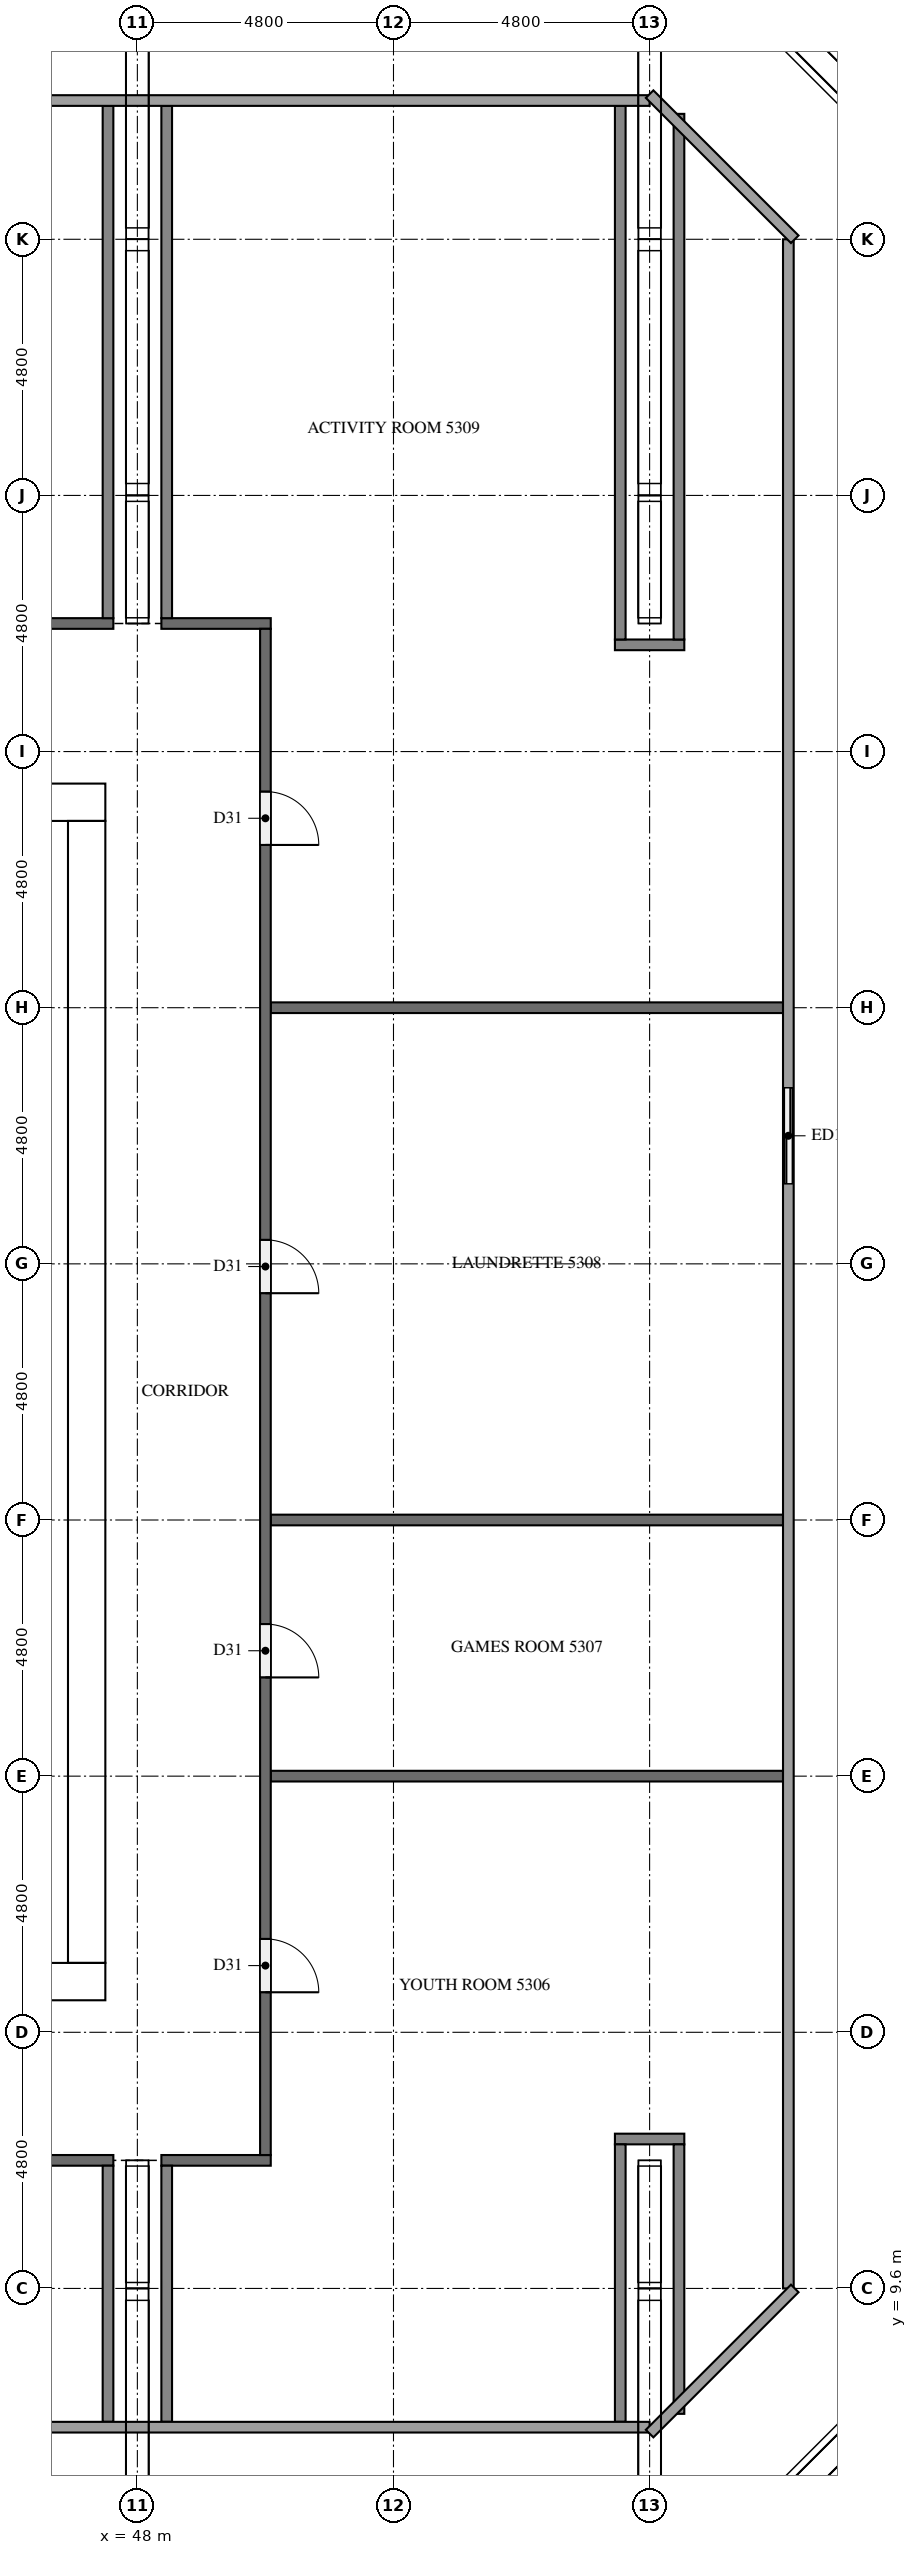
"""IFC4 building model, lengths in metres.
Left out: names, types, materials, properties, quantities, classifications, styles, units other than length and angle.
Written with IfcOpenShell. Run it as: python <this file> out.ifc"""

import sys

from ifc_helpers import new_model, si_unit, direction, frame, frame_2d, origin, place, context, subcontext, project, spatial, rectangle, extrude, element, fill, save


model = new_model("IFC4")
c1 = context("Model", 3, precision=1e-05, world=origin(), true_north=direction((0.0, 1.0)))
c2 = subcontext(c1, "Body", "Model", "MODEL_VIEW")
j1 = project(units=[si_unit("LENGTHUNIT", "METRE"), si_unit("PLANEANGLEUNIT", "RADIAN")], contexts=[c1])
p1 = place(None, origin())
s1 = spatial("IfcSite", under=j1, at=p1, CompositionType="ELEMENT")
p2 = place(p1, origin())
s2 = spatial("IfcBuilding", under=s1, at=p2, CompositionType="ELEMENT")
p3 = place(p2, frame((0.0, 0.0, 203.4)))
s3 = spatial("IfcBuildingStorey", under=s2, at=p3, CompositionType="ELEMENT", Elevation=203.4)
p4 = place(p3, frame((15.0, 15.35, 0.0), z_axis=(0.0, 0.0, 1.0), x_axis=(1.0, 0.0, 0.0)))
e1 = element("IfcWall", 1, at=p4, inside=s3, PredefinedType="SHEAR", context=c2, shape_type="SweptSolid", body=[
    extrude(rectangle(XDim=32.4, YDim=0.7, at=frame_2d((16.2, 0.0))), origin(), (0.0, 0.0, 1.0), 5.1),
])
p5 = place(p4, frame((15.3, 0.0, 0.0)))
e2 = element("IfcOpeningElement", 2, at=p5, cuts=e1, PredefinedType="OPENING", context=c2, shape_type="SweptSolid", body=[
    extrude(rectangle(XDim=1.8, YDim=2.1, at=frame_2d((0.9, 1.05))), frame((0.0, 0.36, 0.0), z_axis=(0.0, -1.0, 0.0), x_axis=(1.0, 0.0, 0.0)), (0.0, 0.0, 1.0), 0.72),
])
p6 = place(p3, frame((15.0, 37.45, 0.0), z_axis=(0.0, 0.0, 1.0), x_axis=(1.0, 0.0, 0.0)))
e3 = element("IfcWall", 3, at=p6, inside=s3, PredefinedType="SHEAR", context=c2, shape_type="SweptSolid", body=[
    extrude(rectangle(XDim=32.4, YDim=0.7, at=frame_2d((16.2, 0.0))), origin(), (0.0, 0.0, 1.0), 5.1),
])
p7 = place(p6, frame((15.3, 0.0, 0.0)))
e4 = element("IfcOpeningElement", 4, at=p7, cuts=e3, PredefinedType="OPENING", context=c2, shape_type="SweptSolid", body=[
    extrude(rectangle(XDim=1.8, YDim=2.1, at=frame_2d((0.9, 1.05))), frame((0.0, 0.36, 0.0), z_axis=(0.0, -1.0, 0.0), x_axis=(1.0, 0.0, 0.0)), (0.0, 0.0, 1.0), 0.72),
])
p8 = place(p6, frame((1.544, 0.0, 0.0)))
e5 = element("IfcOpeningElement", 5, at=p8, cuts=e3, PredefinedType="OPENING", context=c2, shape_type="SweptSolid", body=[
    extrude(rectangle(XDim=1.0, YDim=2.1, at=frame_2d((0.5, 1.05))), frame((0.0, 0.36, 0.0), z_axis=(0.0, -1.0, 0.0), x_axis=(1.0, 0.0, 0.0)), (0.0, 0.0, 1.0), 0.72),
])
p9 = place(p6, frame((5.219, 0.0, 0.0)))
e6 = element("IfcOpeningElement", 6, at=p9, cuts=e3, PredefinedType="OPENING", context=c2, shape_type="SweptSolid", body=[
    extrude(rectangle(XDim=1.0, YDim=2.1, at=frame_2d((0.5, 1.05))), frame((0.0, 0.36, 0.0), z_axis=(0.0, -1.0, 0.0), x_axis=(1.0, 0.0, 0.0)), (0.0, 0.0, 1.0), 0.72),
])
p10 = place(p3, frame((47.05, 15.7, 0.0), z_axis=(0.0, 0.0, 1.0), x_axis=(0.0, 1.0, 0.0)))
e7 = element("IfcWall", 7, at=p10, inside=s3, PredefinedType="SHEAR", context=c2, shape_type="SweptSolid", body=[
    extrude(rectangle(XDim=21.4, YDim=0.7, at=frame_2d((10.7, 0.0))), origin(), (0.0, 0.0, 1.0), 5.1),
])
p11 = place(p10, frame((10.4, 0.0, 0.0)))
e8 = element("IfcOpeningElement", 8, at=p11, cuts=e7, PredefinedType="OPENING", context=c2, shape_type="SweptSolid", body=[
    extrude(rectangle(XDim=1.2, YDim=2.1, at=frame_2d((0.6, 1.05))), frame((0.0, 0.36, 0.0), z_axis=(0.0, -1.0, 0.0), x_axis=(1.0, 0.0, 0.0)), (0.0, 0.0, 1.0), 0.72),
])
p12 = place(p3, frame((60.2, 30.0, 0.0), z_axis=(0.0, 0.0, 1.0), x_axis=(0.0, 1.0, 0.0)))
e9 = element("IfcWall", 9, at=p12, inside=s3, PredefinedType="SOLIDWALL", context=c2, shape_type="SweptSolid", body=[
    extrude(rectangle(XDim=2.4, YDim=0.15, at=frame_2d((1.2, 0.0))), origin(), (0.0, 0.0, 1.0), 5.1),
])
p13 = place(p12, frame((0.3, 0.0, 0.0)))
e10 = element("IfcOpeningElement", 10, at=p13, cuts=e9, PredefinedType="OPENING", context=c2, shape_type="SweptSolid", body=[
    extrude(rectangle(XDim=1.8, YDim=2.4, at=frame_2d((0.9, 1.2))), frame((0.0, 0.085, 0.0), z_axis=(0.0, -1.0, 0.0), x_axis=(1.0, 0.0, 0.0)), (0.0, 0.0, 1.0), 0.17),
])
p14 = place(p3, frame((47.55, 12.0, 0.0), z_axis=(0.0, 0.0, 1.0), x_axis=(-1.0, 0.0, 0.0)))
e11 = element("IfcWall", 11, at=p14, inside=s3, PredefinedType="PARTITIONING", context=c2, shape_type="SweptSolid", body=[
    extrude(rectangle(XDim=8.7, YDim=0.2, at=frame_2d((4.35, 0.0))), origin(), (0.0, 0.0, 1.0), 5.1),
])
p15 = place(p14, frame((6.0, 0.0, 0.0)))
e12 = element("IfcOpeningElement", 12, at=p15, cuts=e11, PredefinedType="OPENING", context=c2, shape_type="SweptSolid", body=[
    extrude(rectangle(XDim=1.0, YDim=2.1, at=frame_2d((0.5, 1.05))), frame((0.0, 0.11, 0.0), z_axis=(0.0, -1.0, 0.0), x_axis=(1.0, 0.0, 0.0)), (0.0, 0.0, 1.0), 0.22),
])
p16 = place(p14, frame((1.65, 0.0, 0.0)))
e13 = element("IfcOpeningElement", 13, at=p16, cuts=e11, PredefinedType="OPENING", context=c2, shape_type="SweptSolid", body=[
    extrude(rectangle(XDim=1.0, YDim=2.1, at=frame_2d((0.5, 1.05))), frame((0.0, 0.11, 0.0), z_axis=(0.0, -1.0, 0.0), x_axis=(1.0, 0.0, 0.0)), (0.0, 0.0, 1.0), 0.22),
])
p17 = place(p3, frame((48.45, 12.0, 0.0), z_axis=(0.0, 0.0, 1.0), x_axis=(1.0, 0.0, 0.0)))
e14 = element("IfcWall", 14, at=p17, inside=s3, PredefinedType="PARTITIONING", context=c2, shape_type="SweptSolid", body=[
    extrude(rectangle(XDim=2.05, YDim=0.2, at=frame_2d((1.025, 0.0))), origin(), (0.0, 0.0, 1.0), 5.1),
])
p18 = place(p3, frame((56.95, 12.4, 0.0), z_axis=(0.0, 0.0, 1.0), x_axis=(1.0, 0.0, 0.0)))
e15 = element("IfcWall", 15, at=p18, inside=s3, PredefinedType="PARTITIONING", context=c2, shape_type="SweptSolid", body=[
    extrude(rectangle(XDim=1.3, YDim=0.2, at=frame_2d((0.65, 0.0))), origin(), (0.0, 0.0, 1.0), 5.1),
])
for number, where, z_axis, x_axis in (
    (16, (50.5, 19.2, 0.0), (0.0, 0.0, 1.0), (1.0, 0.0, 0.0)),
    (17, (50.5, 24.0, 0.0), (0.0, 0.0, 1.0), (1.0, 0.0, 0.0)),
    (18, (50.5, 33.6, 0.0), (0.0, 0.0, 1.0), (1.0, 0.0, 0.0)),
):
    element("IfcWall", number, at=place(p3, frame(where, z_axis=z_axis, x_axis=x_axis)), inside=s3, PredefinedType="PARTITIONING", context=c2, shape_type="SweptSolid", body=[
        extrude(rectangle(XDim=9.6, YDim=0.2, at=frame_2d((4.8, 0.0))), origin(), (0.0, 0.0, 1.0), 5.1),
    ])
p19 = place(p3, frame((56.95, 40.4, 0.0), z_axis=(0.0, 0.0, 1.0), x_axis=(1.0, 0.0, 0.0)))
e19 = element("IfcWall", 19, at=p19, inside=s3, PredefinedType="PARTITIONING", context=c2, shape_type="SweptSolid", body=[
    extrude(rectangle(XDim=1.3, YDim=0.2, at=frame_2d((0.65, 0.0))), origin(), (0.0, 0.0, 1.0), 5.1),
])
p20 = place(p3, frame((38.85, 40.8, 0.0), z_axis=(0.0, 0.0, 1.0), x_axis=(1.0, 0.0, 0.0)))
e20 = element("IfcWall", 20, at=p20, inside=s3, PredefinedType="PARTITIONING", context=c2, shape_type="SweptSolid", body=[
    extrude(rectangle(XDim=8.7, YDim=0.2, at=frame_2d((4.35, 0.0))), origin(), (0.0, 0.0, 1.0), 5.1),
])
p21 = place(p20, frame((3.85, 0.0, 0.0)))
e21 = element("IfcOpeningElement", 21, at=p21, cuts=e20, PredefinedType="OPENING", context=c2, shape_type="SweptSolid", body=[
    extrude(rectangle(XDim=1.0, YDim=2.1, at=frame_2d((0.5, 1.05))), frame((0.0, 0.11, 0.0), z_axis=(0.0, -1.0, 0.0), x_axis=(1.0, 0.0, 0.0)), (0.0, 0.0, 1.0), 0.22),
])
p22 = place(p3, frame((48.45, 40.8, 0.0), z_axis=(0.0, 0.0, 1.0), x_axis=(1.0, 0.0, 0.0)))
e22 = element("IfcWall", 22, at=p22, inside=s3, PredefinedType="PARTITIONING", context=c2, shape_type="SweptSolid", body=[
    extrude(rectangle(XDim=2.05, YDim=0.2, at=frame_2d((1.025, 0.0))), origin(), (0.0, 0.0, 1.0), 5.1),
])
p23 = place(p3, frame((47.45, 7.1, 0.0), z_axis=(0.0, 0.0, 1.0), x_axis=(0.0, 1.0, 0.0)))
e23 = element("IfcWall", 23, at=p23, inside=s3, PredefinedType="PARTITIONING", context=c2, shape_type="SweptSolid", body=[
    extrude(rectangle(XDim=4.8, YDim=0.2, at=frame_2d((2.4, 0.0))), origin(), (0.0, 0.0, 1.0), 5.1),
])
p24 = place(p3, frame((47.45, 40.9, 0.0), z_axis=(0.0, 0.0, 1.0), x_axis=(0.0, 1.0, 0.0)))
e24 = element("IfcWall", 24, at=p24, inside=s3, PredefinedType="PARTITIONING", context=c2, shape_type="SweptSolid", body=[
    extrude(rectangle(XDim=9.6, YDim=0.2, at=frame_2d((4.8, 0.0))), origin(), (0.0, 0.0, 1.0), 5.1),
])
p25 = place(p3, frame((48.55, 7.1, 0.0), z_axis=(0.0, 0.0, 1.0), x_axis=(0.0, 1.0, 0.0)))
e25 = element("IfcWall", 25, at=p25, inside=s3, PredefinedType="PARTITIONING", context=c2, shape_type="SweptSolid", body=[
    extrude(rectangle(XDim=4.8, YDim=0.2, at=frame_2d((2.4, 0.0))), origin(), (0.0, 0.0, 1.0), 5.1),
])
p26 = place(p3, frame((48.55, 40.9, 0.0), z_axis=(0.0, 0.0, 1.0), x_axis=(0.0, 1.0, 0.0)))
e26 = element("IfcWall", 26, at=p26, inside=s3, PredefinedType="PARTITIONING", context=c2, shape_type="SweptSolid", body=[
    extrude(rectangle(XDim=9.6, YDim=0.2, at=frame_2d((4.8, 0.0))), origin(), (0.0, 0.0, 1.0), 5.1),
])
p27 = place(p3, frame((50.4, 40.7, 0.0), z_axis=(0.0, 0.0, 1.0), x_axis=(0.0, -1.0, 0.0)))
e27 = element("IfcWall", 27, at=p27, inside=s3, PredefinedType="PARTITIONING", context=c2, shape_type="SweptSolid", body=[
    extrude(rectangle(XDim=28.6, YDim=0.2, at=frame_2d((14.3, 0.0))), origin(), (0.0, 0.0, 1.0), 5.1),
])
p28 = place(p27, frame((24.55, 0.0, 0.0)))
e28 = element("IfcOpeningElement", 28, at=p28, cuts=e27, PredefinedType="OPENING", context=c2, shape_type="SweptSolid", body=[
    extrude(rectangle(XDim=1.0, YDim=2.1, at=frame_2d((0.5, 1.05))), frame((0.0, 0.11, 0.0), z_axis=(0.0, -1.0, 0.0), x_axis=(1.0, 0.0, 0.0)), (0.0, 0.0, 1.0), 0.22),
])
p29 = place(p27, frame((18.65, 0.0, 0.0)))
e29 = element("IfcOpeningElement", 29, at=p29, cuts=e27, PredefinedType="OPENING", context=c2, shape_type="SweptSolid", body=[
    extrude(rectangle(XDim=1.0, YDim=2.1, at=frame_2d((0.5, 1.05))), frame((0.0, 0.11, 0.0), z_axis=(0.0, -1.0, 0.0), x_axis=(1.0, 0.0, 0.0)), (0.0, 0.0, 1.0), 0.22),
])
p30 = place(p27, frame((11.45, 0.0, 0.0)))
e30 = element("IfcOpeningElement", 30, at=p30, cuts=e27, PredefinedType="OPENING", context=c2, shape_type="SweptSolid", body=[
    extrude(rectangle(XDim=1.0, YDim=2.1, at=frame_2d((0.5, 1.05))), frame((0.0, 0.11, 0.0), z_axis=(0.0, -1.0, 0.0), x_axis=(1.0, 0.0, 0.0)), (0.0, 0.0, 1.0), 0.22),
])
p31 = place(p27, frame((3.05, 0.0, 0.0)))
e31 = element("IfcOpeningElement", 31, at=p31, cuts=e27, PredefinedType="OPENING", context=c2, shape_type="SweptSolid", body=[
    extrude(rectangle(XDim=1.0, YDim=2.1, at=frame_2d((0.5, 1.05))), frame((0.0, 0.11, 0.0), z_axis=(0.0, -1.0, 0.0), x_axis=(1.0, 0.0, 0.0)), (0.0, 0.0, 1.0), 0.22),
])
p32 = place(p3, frame((57.05, 7.1, 0.0), z_axis=(0.0, 0.0, 1.0), x_axis=(0.0, 1.0, 0.0)))
e32 = element("IfcWall", 32, at=p32, inside=s3, PredefinedType="PARTITIONING", context=c2, shape_type="SweptSolid", body=[
    extrude(rectangle(XDim=5.2, YDim=0.2, at=frame_2d((2.6, 0.0))), origin(), (0.0, 0.0, 1.0), 5.1),
])
p33 = place(p3, frame((57.05, 40.5, 0.0), z_axis=(0.0, 0.0, 1.0), x_axis=(0.0, 1.0, 0.0)))
e33 = element("IfcWall", 33, at=p33, inside=s3, PredefinedType="PARTITIONING", context=c2, shape_type="SweptSolid", body=[
    extrude(rectangle(XDim=10.0, YDim=0.2, at=frame_2d((5.0, 0.0))), origin(), (0.0, 0.0, 1.0), 5.1),
])
p34 = place(p3, frame((58.15, 7.25, 0.0), z_axis=(0.0, 0.0, 1.0), x_axis=(0.0, 1.0, 0.0)))
e34 = element("IfcWall", 34, at=p34, inside=s3, PredefinedType="PARTITIONING", context=c2, shape_type="SweptSolid", body=[
    extrude(rectangle(XDim=5.05, YDim=0.2, at=frame_2d((2.525, 0.0))), origin(), (0.0, 0.0, 1.0), 5.1),
])
p35 = place(p3, frame((58.15, 40.5, 0.0), z_axis=(0.0, 0.0, 1.0), x_axis=(0.0, 1.0, 0.0)))
e35 = element("IfcWall", 35, at=p35, inside=s3, PredefinedType="PARTITIONING", context=c2, shape_type="SweptSolid", body=[
    extrude(rectangle(XDim=9.85, YDim=0.2, at=frame_2d((4.925, 0.0))), origin(), (0.0, 0.0, 1.0), 5.1),
])
p36 = place(p13, origin())
e36 = element("IfcDoor", 36, at=p36, inside=s3, OperationType="SLIDING_TO_LEFT", PredefinedType="DOOR", context=c2, shape_type="SweptSolid", body=[
    extrude(rectangle(XDim=1.8, YDim=2.4, at=frame_2d((0.9, 1.2))), frame((0.0, 0.025, 0.0), z_axis=(0.0, -1.0, 0.0), x_axis=(1.0, 0.0, 0.0)), (0.0, 0.0, 1.0), 0.05),
])
fill(e10, e36)
p37 = place(p11, origin())
e37 = element("IfcDoor", 37, at=p37, inside=s3, OperationType="SINGLE_SWING_LEFT", PredefinedType="DOOR", context=c2, shape_type="SweptSolid", body=[
    extrude(rectangle(XDim=1.2, YDim=2.1, at=frame_2d((0.6, 1.05))), frame((0.0, 0.025, 0.0), z_axis=(0.0, -1.0, 0.0), x_axis=(1.0, 0.0, 0.0)), (0.0, 0.0, 1.0), 0.05),
])
fill(e8, e37)
p38 = place(p28, origin())
e38 = element("IfcDoor", 38, at=p38, inside=s3, OperationType="SINGLE_SWING_RIGHT", PredefinedType="DOOR", context=c2, shape_type="SweptSolid", body=[
    extrude(rectangle(XDim=1.0, YDim=2.1, at=frame_2d((0.5, 1.05))), frame((0.0, 0.025, 0.0), z_axis=(0.0, -1.0, 0.0), x_axis=(1.0, 0.0, 0.0)), (0.0, 0.0, 1.0), 0.05),
])
fill(e28, e38)
p39 = place(p29, origin())
e39 = element("IfcDoor", 39, at=p39, inside=s3, OperationType="SINGLE_SWING_RIGHT", PredefinedType="DOOR", context=c2, shape_type="SweptSolid", body=[
    extrude(rectangle(XDim=1.0, YDim=2.1, at=frame_2d((0.5, 1.05))), frame((0.0, 0.025, 0.0), z_axis=(0.0, -1.0, 0.0), x_axis=(1.0, 0.0, 0.0)), (0.0, 0.0, 1.0), 0.05),
])
fill(e29, e39)
p40 = place(p30, origin())
e40 = element("IfcDoor", 40, at=p40, inside=s3, OperationType="SINGLE_SWING_RIGHT", PredefinedType="DOOR", context=c2, shape_type="SweptSolid", body=[
    extrude(rectangle(XDim=1.0, YDim=2.1, at=frame_2d((0.5, 1.05))), frame((0.0, 0.025, 0.0), z_axis=(0.0, -1.0, 0.0), x_axis=(1.0, 0.0, 0.0)), (0.0, 0.0, 1.0), 0.05),
])
fill(e30, e40)
p41 = place(p31, origin())
e41 = element("IfcDoor", 41, at=p41, inside=s3, OperationType="SINGLE_SWING_RIGHT", PredefinedType="DOOR", context=c2, shape_type="SweptSolid", body=[
    extrude(rectangle(XDim=1.0, YDim=2.1, at=frame_2d((0.5, 1.05))), frame((0.0, 0.025, 0.0), z_axis=(0.0, -1.0, 0.0), x_axis=(1.0, 0.0, 0.0)), (0.0, 0.0, 1.0), 0.05),
])
fill(e31, e41)
save(model, sys.argv[1])
